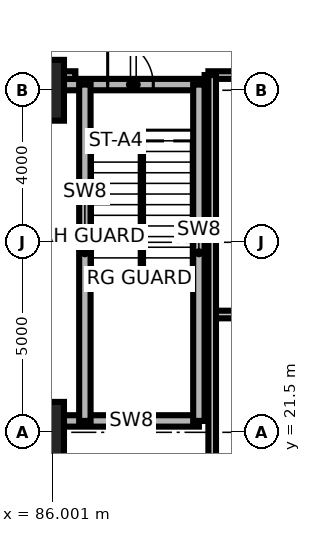
"""IFC4 building model, lengths in metres.
Left out: names, types, materials, properties, quantities, classifications, styles, units other than length and angle.
Written with IfcOpenShell. Run it as: python <this file> out.ifc"""

import sys

from ifc_helpers import new_model, si_unit, direction, frame, frame_2d, origin, origin_2d, place, context, subcontext, project, spatial, rectangle, extrude, element, fill, save


model = new_model("IFC4")
c1 = context("Model", 3, precision=1e-05, world=origin(), true_north=direction((0.0, 1.0)))
c2 = subcontext(c1, "Body", "Model", "MODEL_VIEW")
j1 = project(units=[si_unit("LENGTHUNIT", "METRE"), si_unit("PLANEANGLEUNIT", "RADIAN")], contexts=[c1])
p1 = place(None, origin())
s1 = spatial("IfcSite", under=j1, at=p1, CompositionType="ELEMENT")
p2 = place(p1, origin())
s2 = spatial("IfcBuilding", under=s1, at=p2, CompositionType="ELEMENT")
p3 = place(p2, frame((0.0, 0.0, 23.5)))
s3 = spatial("IfcBuildingStorey", under=s2, at=p3, CompositionType="ELEMENT", Elevation=23.5)
for number, where, z_axis, x_axis in (
    (1, (85.5, 21.5, 0.0), (0.0, 0.0, 1.0), (1.0, 0.0, 0.0)),
    (2, (85.5, 30.5, 0.0), (0.0, 0.0, 1.0), (1.0, 0.0, 0.0)),
):
    element("IfcColumn", number, at=place(p3, frame(where, z_axis=z_axis, x_axis=x_axis)), inside=s3, PredefinedType="COLUMN", context=c2, shape_type="SweptSolid", body=[
        extrude(rectangle(XDim=1.6, YDim=1.6, at=origin_2d()), origin(), (0.0, 0.0, 1.0), 5.0),
    ])
p4 = place(p3, frame((86.3, 21.8, 0.0), z_axis=(0.0, 0.0, 1.0), x_axis=(1.0, 0.0, 0.0)))
e3 = element("IfcWall", 3, at=p4, inside=s3, PredefinedType="SHEAR", context=c2, shape_type="SweptSolid", body=[
    extrude(rectangle(XDim=3.55, YDim=0.3, at=frame_2d((1.775, 0.0))), origin(), (0.0, 0.0, 1.0), 4.7),
])
p5 = place(p3, frame((90.2, 24.6, 0.0), z_axis=(0.0, 0.0, 1.0), x_axis=(1.0, 0.0, 0.0)))
e4 = element("IfcWall", 4, at=p5, inside=s3, PredefinedType="PARTITIONING", context=c2, shape_type="SweptSolid", body=[
    extrude(rectangle(XDim=14.73, YDim=0.2, at=frame_2d((7.365, 0.0))), origin(), (0.0, 0.0, 1.0), 4.7),
])
p6 = place(p5, frame((6.925, 0.0, 0.0)))
e5 = element("IfcOpeningElement", 5, at=p6, cuts=e4, PredefinedType="OPENING", context=c2, shape_type="SweptSolid", body=[
    extrude(rectangle(XDim=1.0, YDim=2.1, at=frame_2d((0.5, 1.05))), frame((0.0, 0.11, 0.0), z_axis=(0.0, -1.0, 0.0), x_axis=(1.0, 0.0, 0.0)), (0.0, 0.0, 1.0), 0.22),
])
p7 = place(p3, frame((86.3, 30.65, 0.0), z_axis=(0.0, 0.0, 1.0), x_axis=(1.0, 0.0, 0.0)))
e6 = element("IfcWall", 6, at=p7, inside=s3, PredefinedType="SHEAR", context=c2, shape_type="SweptSolid", body=[
    extrude(rectangle(XDim=3.8, YDim=0.3, at=frame_2d((1.9, 0.0))), origin(), (0.0, 0.0, 1.0), 4.7),
])
p8 = place(p7, frame((1.15, 0.0, 0.0)))
e7 = element("IfcOpeningElement", 7, at=p8, cuts=e6, PredefinedType="OPENING", context=c2, shape_type="SweptSolid", body=[
    extrude(rectangle(XDim=1.2, YDim=2.1, at=frame_2d((0.6, 1.05))), frame((0.0, 0.16, 0.0), z_axis=(0.0, -1.0, 0.0), x_axis=(1.0, 0.0, 0.0)), (0.0, 0.0, 1.0), 0.32),
])
p9 = place(p3, frame((84.6, 30.9, 0.0), z_axis=(0.0, 0.0, 1.0), x_axis=(1.0, 0.0, 0.0)))
e8 = element("IfcWall", 8, at=p9, inside=s3, PredefinedType="PARTITIONING", context=c2, shape_type="SweptSolid", body=[
    extrude(rectangle(XDim=2.0, YDim=0.2, at=frame_2d((1.0, 0.0))), origin(), (0.0, 0.0, 1.0), 4.7),
])
p10 = place(p3, frame((90.1, 30.9, 0.0), z_axis=(0.0, 0.0, 1.0), x_axis=(1.0, 0.0, 0.0)))
e9 = element("IfcWall", 9, at=p10, inside=s3, PredefinedType="PARTITIONING", context=c2, shape_type="SweptSolid", body=[
    extrude(rectangle(XDim=14.83, YDim=0.2, at=frame_2d((7.415, 0.0))), origin(), (0.0, 0.0, 1.0), 2.7),
])
p11 = place(p10, frame((5.73, 0.0, 0.0)))
e10 = element("IfcOpeningElement", 10, at=p11, cuts=e9, PredefinedType="OPENING", context=c2, shape_type="SweptSolid", body=[
    extrude(rectangle(XDim=1.6, YDim=2.1, at=frame_2d((0.8, 1.05))), frame((0.0, 0.11, 0.0), z_axis=(0.0, -1.0, 0.0), x_axis=(1.0, 0.0, 0.0)), (0.0, 0.0, 1.0), 0.22),
])
for number, where, z_axis, x_axis in (
    (11, (86.85, 21.8, 0.0), (0.0, 0.0, 1.0), (0.0, 1.0, 0.0)),
    (12, (89.85, 21.8, 0.0), (0.0, 0.0, 1.0), (0.0, 1.0, 0.0)),
):
    element("IfcWall", number, at=place(p3, frame(where, z_axis=z_axis, x_axis=x_axis)), inside=s3, PredefinedType="SHEAR", context=c2, shape_type="SweptSolid", body=[
        extrude(rectangle(XDim=8.85, YDim=0.3, at=frame_2d((4.425, 0.0))), origin(), (0.0, 0.0, 1.0), 4.7),
    ])
p12 = place(p3, frame((90.1, 30.65, 0.0), z_axis=(0.0, 0.0, 1.0), x_axis=(0.0, 1.0, 0.0)))
e13 = element("IfcWall", 13, at=p12, inside=s3, PredefinedType="PARTITIONING", context=c2, shape_type="SweptSolid", body=[
    extrude(rectangle(XDim=0.25, YDim=0.2, at=frame_2d((0.125, 0.0))), origin(), (0.0, 0.0, 1.0), 4.7),
])
p13 = place(p3, frame((90.2, 11.07, 0.0), z_axis=(0.0, 0.0, 1.0), x_axis=(0.0, 1.0, 0.0)))
e14 = element("IfcWall", 14, at=p13, inside=s3, PredefinedType="PARTITIONING", context=c2, shape_type="SweptSolid", body=[
    extrude(rectangle(XDim=19.83, YDim=0.2, at=frame_2d((9.915, 0.0))), origin(), (0.0, 0.0, 1.0), 4.7),
])
p14 = place(p8, origin())
e15 = element("IfcDoor", 15, at=p14, inside=s3, OperationType="SINGLE_SWING_RIGHT", PredefinedType="DOOR", context=c2, shape_type="SweptSolid", body=[
    extrude(rectangle(XDim=1.2, YDim=2.1, at=frame_2d((0.6, 1.05))), frame((0.0, 0.025, 0.0), z_axis=(0.0, -1.0, 0.0), x_axis=(1.0, 0.0, 0.0)), (0.0, 0.0, 1.0), 0.05),
])
fill(e7, e15)
save(model, sys.argv[1])
